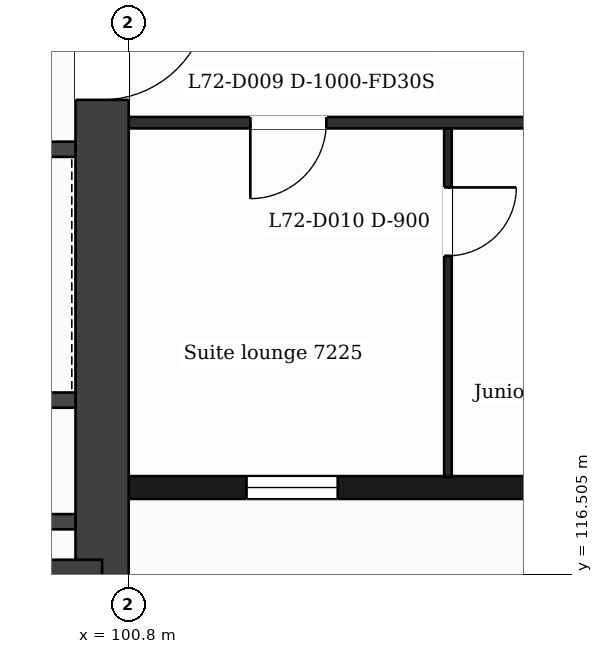
"""IFC4 building model, lengths in metres.
Left out: names, types, materials, properties, quantities, classifications, styles, units other than length and angle.
Written with IfcOpenShell. Run it as: python <this file> out.ifc"""

import sys

from ifc_helpers import new_model, si_unit, direction, frame, frame_2d, origin, place, context, subcontext, project, spatial, rectangle, extrude, element, fill, save


model = new_model("IFC4")
c1 = context("Model", 3, precision=1e-05, world=origin(), true_north=direction((0.0, 1.0)))
c2 = subcontext(c1, "Body", "Model", "MODEL_VIEW")
j1 = project(units=[si_unit("LENGTHUNIT", "METRE"), si_unit("PLANEANGLEUNIT", "RADIAN")], contexts=[c1])
p1 = place(None, origin())
s1 = spatial("IfcSite", under=j1, at=p1, CompositionType="ELEMENT")
p2 = place(p1, origin())
s2 = spatial("IfcBuilding", under=s1, at=p2, CompositionType="ELEMENT")
p3 = place(p2, frame((0.0, 0.0, 296.0)))
s3 = spatial("IfcBuildingStorey", under=s2, at=p3, CompositionType="ELEMENT", Elevation=296.0)
p4 = place(p3, frame((100.45, 132.05, 0.0), z_axis=(0.0, 0.0, 1.0), x_axis=(0.0, -1.0, 0.0)))
e1 = element("IfcWall", 1, at=p4, inside=s3, PredefinedType="SHEAR", context=c2, shape_type="SweptSolid", body=[
    extrude(rectangle(XDim=15.7, YDim=0.7, at=frame_2d((7.85, 0.0))), origin(), (0.0, 0.0, 1.0), 3.7),
])
p5 = place(p4, frame((7.9, 0.0, 0.0)))
e2 = element("IfcOpeningElement", 2, at=p5, cuts=e1, PredefinedType="OPENING", context=c2, shape_type="SweptSolid", body=[
    extrude(rectangle(XDim=1.4, YDim=2.1, at=frame_2d((0.7, 1.05))), frame((0.0, 0.36, 0.0), z_axis=(0.0, -1.0, 0.0), x_axis=(1.0, 0.0, 0.0)), (0.0, 0.0, 1.0), 0.72),
])
p6 = place(p3, frame((100.45, 116.35, 0.0), z_axis=(0.0, 0.0, 1.0), x_axis=(-1.0, 0.0, 0.0)))
e3 = element("IfcWall", 3, at=p6, inside=s3, PredefinedType="SHEAR", context=c2, shape_type="SweptSolid", body=[
    extrude(rectangle(XDim=13.627, YDim=0.7, at=frame_2d((6.813, 0.0))), origin(), (0.0, 0.0, 1.0), 3.7),
])
p7 = place(p3, frame((100.8, 117.65, 0.0), z_axis=(0.0, 0.0, 1.0), x_axis=(1.0, 0.0, 0.0)))
e4 = element("IfcWall", 4, at=p7, inside=s3, PredefinedType="SOLIDWALL", context=c2, shape_type="SweptSolid", body=[
    extrude(rectangle(XDim=25.2, YDim=0.3, at=frame_2d((12.6, 0.0))), origin(), (0.0, 0.0, 1.0), 3.38),
])
p8 = place(p7, frame((1.55, 0.0, 0.9)))
e5 = element("IfcOpeningElement", 5, at=p8, cuts=e4, PredefinedType="OPENING", context=c2, shape_type="SweptSolid", body=[
    extrude(rectangle(XDim=1.2, YDim=2.1, at=frame_2d((0.6, 1.05))), frame((0.0, 0.16, 0.0), z_axis=(0.0, -1.0, 0.0), x_axis=(1.0, 0.0, 0.0)), (0.0, 0.0, 1.0), 0.32),
])
p9 = place(p7, frame((5.7, 0.0, 0.9)))
e6 = element("IfcOpeningElement", 6, at=p9, cuts=e4, PredefinedType="OPENING", context=c2, shape_type="SweptSolid", body=[
    extrude(rectangle(XDim=1.2, YDim=2.1, at=frame_2d((0.6, 1.05))), frame((0.0, 0.16, 0.0), z_axis=(0.0, -1.0, 0.0), x_axis=(1.0, 0.0, 0.0)), (0.0, 0.0, 1.0), 0.32),
])
p10 = place(p7, frame((9.0, 0.0, 0.0)))
e7 = element("IfcOpeningElement", 7, at=p10, cuts=e4, PredefinedType="OPENING", context=c2, shape_type="SweptSolid", body=[
    extrude(rectangle(XDim=1.2, YDim=2.4, at=frame_2d((0.6, 1.2))), frame((0.0, 0.16, 0.0), z_axis=(0.0, -1.0, 0.0), x_axis=(1.0, 0.0, 0.0)), (0.0, 0.0, 1.0), 0.32),
])
p11 = place(p7, frame((10.8, 0.0, 0.9)))
e8 = element("IfcOpeningElement", 8, at=p11, cuts=e4, PredefinedType="OPENING", context=c2, shape_type="SweptSolid", body=[
    extrude(rectangle(XDim=1.2, YDim=2.1, at=frame_2d((0.6, 1.05))), frame((0.0, 0.16, 0.0), z_axis=(0.0, -1.0, 0.0), x_axis=(1.0, 0.0, 0.0)), (0.0, 0.0, 1.0), 0.32),
])
p12 = place(p7, frame((13.5, 0.0, 0.9)))
e9 = element("IfcOpeningElement", 9, at=p12, cuts=e4, PredefinedType="OPENING", context=c2, shape_type="SweptSolid", body=[
    extrude(rectangle(XDim=2.4, YDim=2.1, at=frame_2d((1.2, 1.05))), frame((0.0, 0.16, 0.0), z_axis=(0.0, -1.0, 0.0), x_axis=(1.0, 0.0, 0.0)), (0.0, 0.0, 1.0), 0.32),
])
p13 = place(p7, frame((17.4, 0.0, 0.0)))
e10 = element("IfcOpeningElement", 10, at=p13, cuts=e4, PredefinedType="OPENING", context=c2, shape_type="SweptSolid", body=[
    extrude(rectangle(XDim=1.2, YDim=2.4, at=frame_2d((0.6, 1.2))), frame((0.0, 0.16, 0.0), z_axis=(0.0, -1.0, 0.0), x_axis=(1.0, 0.0, 0.0)), (0.0, 0.0, 1.0), 0.32),
])
p14 = place(p7, frame((19.2, 0.0, 0.9)))
e11 = element("IfcOpeningElement", 11, at=p14, cuts=e4, PredefinedType="OPENING", context=c2, shape_type="SweptSolid", body=[
    extrude(rectangle(XDim=1.2, YDim=2.1, at=frame_2d((0.6, 1.05))), frame((0.0, 0.16, 0.0), z_axis=(0.0, -1.0, 0.0), x_axis=(1.0, 0.0, 0.0)), (0.0, 0.0, 1.0), 0.32),
])
p15 = place(p7, frame((21.85, 0.0, 0.9)))
e12 = element("IfcOpeningElement", 12, at=p15, cuts=e4, PredefinedType="OPENING", context=c2, shape_type="SweptSolid", body=[
    extrude(rectangle(XDim=2.4, YDim=2.1, at=frame_2d((1.2, 1.05))), frame((0.0, 0.16, 0.0), z_axis=(0.0, -1.0, 0.0), x_axis=(1.0, 0.0, 0.0)), (0.0, 0.0, 1.0), 0.32),
])
for number, where, z_axis, x_axis in (
    (13, (95.227, 117.2, 0.0), (0.0, 0.0, 1.0), (1.0, 0.0, 0.0)),
    (14, (95.227, 118.8, 0.0), (0.0, 0.0, 1.0), (1.0, 0.0, 0.0)),
):
    element("IfcWall", number, at=place(p3, frame(where, z_axis=z_axis, x_axis=x_axis)), inside=s3, PredefinedType="PARTITIONING", context=c2, shape_type="SweptSolid", body=[
        extrude(rectangle(XDim=4.873, YDim=0.2, at=frame_2d((2.437, 0.0))), origin(), (0.0, 0.0, 1.0), 3.38),
    ])
p16 = place(p3, frame((95.227, 122.1, 0.0), z_axis=(0.0, 0.0, 1.0), x_axis=(1.0, 0.0, 0.0)))
e15 = element("IfcWall", 15, at=p16, inside=s3, PredefinedType="PARTITIONING", context=c2, shape_type="SweptSolid", body=[
    extrude(rectangle(XDim=4.873, YDim=0.2, at=frame_2d((2.437, 0.0))), origin(), (0.0, 0.0, 1.0), 3.38),
])
p17 = place(p16, frame((0.732, 0.0, 0.0)))
e16 = element("IfcOpeningElement", 16, at=p17, cuts=e15, PredefinedType="OPENING", context=c2, shape_type="SweptSolid", body=[
    extrude(rectangle(XDim=1.1, YDim=2.1, at=frame_2d((0.55, 1.05))), frame((0.0, 0.11, 0.0), z_axis=(0.0, -1.0, 0.0), x_axis=(1.0, 0.0, 0.0)), (0.0, 0.0, 1.0), 0.22),
])
p18 = place(p16, frame((3.264, 0.0, 0.0)))
e17 = element("IfcOpeningElement", 17, at=p18, cuts=e15, PredefinedType="OPENING", context=c2, shape_type="SweptSolid", body=[
    extrude(rectangle(XDim=1.1, YDim=2.1, at=frame_2d((0.55, 1.05))), frame((0.0, 0.11, 0.0), z_axis=(0.0, -1.0, 0.0), x_axis=(1.0, 0.0, 0.0)), (0.0, 0.0, 1.0), 0.22),
])
p19 = place(p3, frame((100.8, 122.45, 0.0), z_axis=(0.0, 0.0, 1.0), x_axis=(1.0, 0.0, 0.0)))
e18 = element("IfcWall", 18, at=p19, inside=s3, PredefinedType="PARTITIONING", context=c2, shape_type="SweptSolid", body=[
    extrude(rectangle(XDim=25.2, YDim=0.15, at=frame_2d((12.6, 0.0))), origin(), (0.0, 0.0, 1.0), 3.38),
])
p20 = place(p19, frame((1.6, 0.0, 0.0)))
e19 = element("IfcOpeningElement", 19, at=p20, cuts=e18, PredefinedType="OPENING", context=c2, shape_type="SweptSolid", body=[
    extrude(rectangle(XDim=1.0, YDim=2.1, at=frame_2d((0.5, 1.05))), frame((0.0, 0.085, 0.0), z_axis=(0.0, -1.0, 0.0), x_axis=(1.0, 0.0, 0.0)), (0.0, 0.0, 1.0), 0.17),
])
p21 = place(p19, frame((11.12, 0.0, 0.0)))
e20 = element("IfcOpeningElement", 20, at=p21, cuts=e18, PredefinedType="OPENING", context=c2, shape_type="SweptSolid", body=[
    extrude(rectangle(XDim=0.95, YDim=2.1, at=frame_2d((0.475, 1.05))), frame((0.0, 0.085, 0.0), z_axis=(0.0, -1.0, 0.0), x_axis=(1.0, 0.0, 0.0)), (0.0, 0.0, 1.0), 0.17),
])
p22 = place(p19, frame((13.05, 0.0, 0.0)))
e21 = element("IfcOpeningElement", 21, at=p22, cuts=e18, PredefinedType="OPENING", context=c2, shape_type="SweptSolid", body=[
    extrude(rectangle(XDim=1.0, YDim=2.1, at=frame_2d((0.5, 1.05))), frame((0.0, 0.085, 0.0), z_axis=(0.0, -1.0, 0.0), x_axis=(1.0, 0.0, 0.0)), (0.0, 0.0, 1.0), 0.17),
])
p23 = place(p19, frame((19.61, 0.0, 0.0)))
e22 = element("IfcOpeningElement", 22, at=p23, cuts=e18, PredefinedType="OPENING", context=c2, shape_type="SweptSolid", body=[
    extrude(rectangle(XDim=0.95, YDim=2.1, at=frame_2d((0.475, 1.05))), frame((0.0, 0.085, 0.0), z_axis=(0.0, -1.0, 0.0), x_axis=(1.0, 0.0, 0.0)), (0.0, 0.0, 1.0), 0.17),
])
p24 = place(p19, frame((21.275, 0.0, 0.0)))
e23 = element("IfcOpeningElement", 23, at=p24, cuts=e18, PredefinedType="OPENING", context=c2, shape_type="SweptSolid", body=[
    extrude(rectangle(XDim=0.95, YDim=2.1, at=frame_2d((0.475, 1.05))), frame((0.0, 0.085, 0.0), z_axis=(0.0, -1.0, 0.0), x_axis=(1.0, 0.0, 0.0)), (0.0, 0.0, 1.0), 0.17),
])
p25 = place(p3, frame((105.0, 117.79, 0.0), z_axis=(0.0, 0.0, 1.0), x_axis=(0.0, 1.0, 0.0)))
e24 = element("IfcWall", 24, at=p25, inside=s3, PredefinedType="PARTITIONING", context=c2, shape_type="SweptSolid", body=[
    extrude(rectangle(XDim=4.585, YDim=0.1, at=frame_2d((2.292, 0.0))), origin(), (0.0, 0.0, 1.0), 3.38),
])
p26 = place(p25, frame((2.908, 0.0, 0.0)))
e25 = element("IfcOpeningElement", 25, at=p26, cuts=e24, PredefinedType="OPENING", context=c2, shape_type="SweptSolid", body=[
    extrude(rectangle(XDim=0.9, YDim=2.1, at=frame_2d((0.45, 1.05))), frame((0.0, 0.06, 0.0), z_axis=(0.0, -1.0, 0.0), x_axis=(1.0, 0.0, 0.0)), (0.0, 0.0, 1.0), 0.12),
])
p27 = place(p8, origin())
e26 = element("IfcWindow", 26, at=p27, inside=s3, PartitioningType="SINGLE_PANEL", PredefinedType="WINDOW", context=c2, shape_type="SweptSolid", body=[
    extrude(rectangle(XDim=1.2, YDim=2.1, at=frame_2d((0.6, 1.05))), frame((0.0, 0.03, 0.0), z_axis=(0.0, -1.0, 0.0), x_axis=(1.0, 0.0, 0.0)), (0.0, 0.0, 1.0), 0.06),
])
fill(e5, e26)
p28 = place(p20, origin())
e27 = element("IfcDoor", 27, at=p28, inside=s3, OperationType="SINGLE_SWING_LEFT", PredefinedType="DOOR", context=c2, shape_type="SweptSolid", body=[
    extrude(rectangle(XDim=1.0, YDim=2.1, at=frame_2d((0.5, 1.05))), frame((0.0, 0.025, 0.0), z_axis=(0.0, -1.0, 0.0), x_axis=(1.0, 0.0, 0.0)), (0.0, 0.0, 1.0), 0.05),
])
fill(e19, e27)
p29 = place(p26, origin())
e28 = element("IfcDoor", 28, at=p29, inside=s3, OperationType="SINGLE_SWING_RIGHT", PredefinedType="DOOR", context=c2, shape_type="SweptSolid", body=[
    extrude(rectangle(XDim=0.9, YDim=2.1, at=frame_2d((0.45, 1.05))), frame((0.0, 0.025, 0.0), z_axis=(0.0, -1.0, 0.0), x_axis=(1.0, 0.0, 0.0)), (0.0, 0.0, 1.0), 0.05),
])
fill(e25, e28)
p30 = place(p5, origin())
e29 = element("IfcDoor", 29, at=p30, inside=s3, OperationType="SINGLE_SWING_LEFT", PredefinedType="DOOR", context=c2, shape_type="SweptSolid", body=[
    extrude(rectangle(XDim=1.4, YDim=2.1, at=frame_2d((0.7, 1.05))), frame((0.0, 0.025, 0.0), z_axis=(0.0, -1.0, 0.0), x_axis=(1.0, 0.0, 0.0)), (0.0, 0.0, 1.0), 0.05),
])
fill(e2, e29)
save(model, sys.argv[1])
